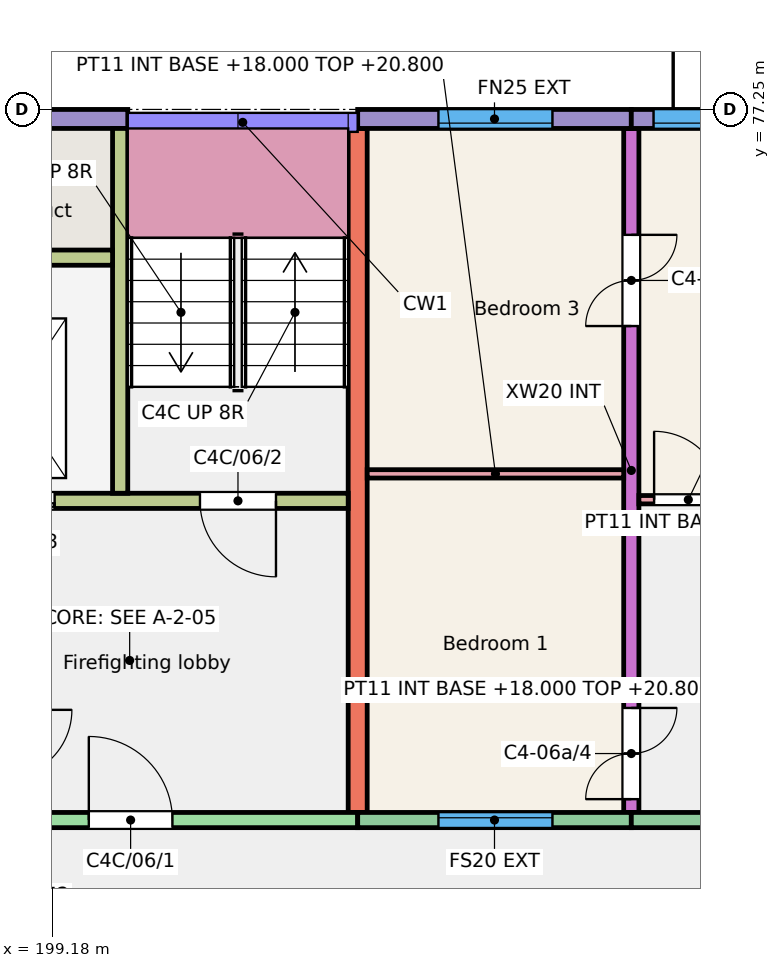
"""IFC4 building model, lengths in metres.
Left out: names, types, materials, properties, quantities, classifications, styles, units other than length and angle.
Written with IfcOpenShell. Run it as: python <this file> out.ifc"""

import sys

from ifc_helpers import new_model, si_unit, direction, frame, frame_2d, origin, place, context, subcontext, project, spatial, rectangle, extrude, element, fill, save


model = new_model("IFC4")
c1 = context("Model", 3, precision=1e-05, world=origin(), true_north=direction((0.0, 1.0)))
c2 = subcontext(c1, "Body", "Model", "MODEL_VIEW")
j1 = project(units=[si_unit("LENGTHUNIT", "METRE"), si_unit("PLANEANGLEUNIT", "RADIAN")], contexts=[c1])
p1 = place(None, origin())
s1 = spatial("IfcSite", under=j1, at=p1, CompositionType="ELEMENT")
p2 = place(p1, origin())
s2 = spatial("IfcBuilding", under=s1, at=p2, CompositionType="ELEMENT")
p3 = place(p2, frame((0.0, 0.0, 18.0)))
s3 = spatial("IfcBuildingStorey", under=s2, at=p3, CompositionType="ELEMENT", Elevation=18.0)
p4 = place(p3, frame((203.2, 68.0, 0.0), z_axis=(0.0, 0.0, 1.0), x_axis=(0.0, 1.0, 0.0)))
e1 = element("IfcWall", 1, at=p4, inside=s3, PredefinedType="SHEAR", context=c2, shape_type="SweptSolid", body=[
    extrude(rectangle(XDim=9.0, YDim=0.25, at=frame_2d((4.5, 0.0))), origin(), (0.0, 0.0, 1.0), 3.0),
])
p5 = place(p3, frame((206.8, 68.0, 0.0), z_axis=(0.0, 0.0, 1.0), x_axis=(0.0, 1.0, 0.0)))
e2 = element("IfcWall", 2, at=p5, inside=s3, PredefinedType="SHEAR", context=c2, shape_type="SweptSolid", body=[
    extrude(rectangle(XDim=9.0, YDim=0.2, at=frame_2d((4.5, 0.0))), origin(), (0.0, 0.0, 1.0), 3.0),
])
p6 = place(p5, frame((0.175, 0.0, 0.0)))
e3 = element("IfcOpeningElement", 3, at=p6, cuts=e2, PredefinedType="OPENING", context=c2, shape_type="SweptSolid", body=[
    extrude(rectangle(XDim=1.2, YDim=2.1, at=frame_2d((0.6, 1.05))), frame((0.0, 0.11, 0.0), z_axis=(0.0, -1.0, 0.0), x_axis=(1.0, 0.0, 0.0)), (0.0, 0.0, 1.0), 0.22),
])
p7 = place(p5, frame((6.4, 0.0, 0.0)))
e4 = element("IfcOpeningElement", 4, at=p7, cuts=e2, PredefinedType="OPENING", context=c2, shape_type="SweptSolid", body=[
    extrude(rectangle(XDim=1.2, YDim=2.1, at=frame_2d((0.6, 1.05))), frame((0.0, 0.11, 0.0), z_axis=(0.0, -1.0, 0.0), x_axis=(1.0, 0.0, 0.0)), (0.0, 0.0, 1.0), 0.22),
])
p8 = place(p3, frame((197.2, 77.125, 0.0), z_axis=(0.0, 0.0, 1.0), x_axis=(1.0, 0.0, 0.0)))
e5 = element("IfcWall", 5, at=p8, inside=s3, PredefinedType="SOLIDWALL", context=c2, shape_type="SweptSolid", body=[
    extrude(rectangle(XDim=2.975, YDim=0.25, at=frame_2d((1.488, 0.0))), origin(), (0.0, 0.0, 1.0), 3.0),
])
p9 = place(p3, frame((197.35, 67.9, 0.0), z_axis=(0.0, 0.0, 1.0), x_axis=(1.0, 0.0, 0.0)))
e6 = element("IfcWall", 6, at=p9, inside=s3, PredefinedType="SHEAR", context=c2, shape_type="SweptSolid", body=[
    extrude(rectangle(XDim=5.85, YDim=0.2, at=frame_2d((2.925, 0.0))), origin(), (0.0, 0.0, 1.0), 3.0),
])
p10 = place(p9, frame((2.312, 0.0, 0.0)))
e7 = element("IfcOpeningElement", 7, at=p10, cuts=e6, PredefinedType="OPENING", context=c2, shape_type="SweptSolid", body=[
    extrude(rectangle(XDim=1.1, YDim=2.1, at=frame_2d((0.55, 1.05))), frame((0.0, 0.11, 0.0), z_axis=(0.0, -1.0, 0.0), x_axis=(1.0, 0.0, 0.0)), (0.0, 0.0, 1.0), 0.22),
])
p11 = place(p3, frame((197.35, 72.1, 0.0), z_axis=(0.0, 0.0, 1.0), x_axis=(1.0, 0.0, 0.0)))
e8 = element("IfcWall", 8, at=p11, inside=s3, PredefinedType="SHEAR", context=c2, shape_type="SweptSolid", body=[
    extrude(rectangle(XDim=5.725, YDim=0.2, at=frame_2d((2.862, 0.0))), origin(), (0.0, 0.0, 1.0), 3.0),
])
p12 = place(p11, frame((3.775, 0.0, 0.0)))
e9 = element("IfcOpeningElement", 9, at=p12, cuts=e8, PredefinedType="OPENING", context=c2, shape_type="SweptSolid", body=[
    extrude(rectangle(XDim=1.0, YDim=2.1, at=frame_2d((0.5, 1.05))), frame((0.0, 0.11, 0.0), z_axis=(0.0, -1.0, 0.0), x_axis=(1.0, 0.0, 0.0)), (0.0, 0.0, 1.0), 0.22),
])
p13 = place(p11, frame((0.762, 0.0, 0.0)))
e10 = element("IfcOpeningElement", 10, at=p13, cuts=e8, PredefinedType="OPENING", context=c2, shape_type="SweptSolid", body=[
    extrude(rectangle(XDim=1.1, YDim=2.1, at=frame_2d((0.55, 1.05))), frame((0.0, 0.11, 0.0), z_axis=(0.0, -1.0, 0.0), x_axis=(1.0, 0.0, 0.0)), (0.0, 0.0, 1.0), 0.22),
])
p14 = place(p3, frame((200.075, 72.2, 0.0), z_axis=(0.0, 0.0, 1.0), x_axis=(0.0, 1.0, 0.0)))
e11 = element("IfcWall", 11, at=p14, inside=s3, PredefinedType="SHEAR", context=c2, shape_type="SweptSolid", body=[
    extrude(rectangle(XDim=4.8, YDim=0.2, at=frame_2d((2.4, 0.0))), origin(), (0.0, 0.0, 1.0), 3.0),
])
p15 = place(p3, frame((197.35, 75.3, 0.0), z_axis=(0.0, 0.0, 1.0), x_axis=(1.0, 0.0, 0.0)))
e12 = element("IfcWall", 12, at=p15, inside=s3, PredefinedType="SHEAR", context=c2, shape_type="SweptSolid", body=[
    extrude(rectangle(XDim=2.625, YDim=0.2, at=frame_2d((1.312, 0.0))), origin(), (0.0, 0.0, 1.0), 3.0),
])
p16 = place(p3, frame((203.2, 77.125, 0.0), z_axis=(0.0, 0.0, 1.0), x_axis=(1.0, 0.0, 0.0)))
e13 = element("IfcWall", 13, at=p16, inside=s3, PredefinedType="SOLIDWALL", context=c2, shape_type="SweptSolid", body=[
    extrude(rectangle(XDim=3.6, YDim=0.25, at=frame_2d((1.8, 0.0))), origin(), (0.0, 0.0, 1.0), 3.0),
])
p17 = place(p16, frame((1.062, 0.0, 0.9)))
e14 = element("IfcOpeningElement", 14, at=p17, cuts=e13, PredefinedType="OPENING", context=c2, shape_type="SweptSolid", body=[
    extrude(rectangle(XDim=1.5, YDim=1.5, at=frame_2d((0.75, 0.75))), frame((0.0, 0.135, 0.0), z_axis=(0.0, -1.0, 0.0), x_axis=(1.0, 0.0, 0.0)), (0.0, 0.0, 1.0), 0.27),
])
p18 = place(p3, frame((203.2, 67.9, 0.0), z_axis=(0.0, 0.0, 1.0), x_axis=(1.0, 0.0, 0.0)))
e15 = element("IfcWall", 15, at=p18, inside=s3, PredefinedType="SOLIDWALL", context=c2, shape_type="SweptSolid", body=[
    extrude(rectangle(XDim=3.6, YDim=0.2, at=frame_2d((1.8, 0.0))), origin(), (0.0, 0.0, 1.0), 3.0),
])
p19 = place(p18, frame((1.062, 0.0, 0.9)))
e16 = element("IfcOpeningElement", 16, at=p19, cuts=e15, PredefinedType="OPENING", context=c2, shape_type="SweptSolid", body=[
    extrude(rectangle(XDim=1.5, YDim=1.5, at=frame_2d((0.75, 0.75))), frame((0.0, 0.11, 0.0), z_axis=(0.0, -1.0, 0.0), x_axis=(1.0, 0.0, 0.0)), (0.0, 0.0, 1.0), 0.22),
])
p20 = place(p3, frame((206.8, 77.125, 0.0), z_axis=(0.0, 0.0, 1.0), x_axis=(1.0, 0.0, 0.0)))
e17 = element("IfcWall", 17, at=p20, inside=s3, PredefinedType="SOLIDWALL", context=c2, shape_type="SweptSolid", body=[
    extrude(rectangle(XDim=3.6, YDim=0.25, at=frame_2d((1.8, 0.0))), origin(), (0.0, 0.0, 1.0), 3.0),
])
p21 = place(p20, frame((0.292, 0.0, 0.9)))
e18 = element("IfcOpeningElement", 18, at=p21, cuts=e17, PredefinedType="OPENING", context=c2, shape_type="SweptSolid", body=[
    extrude(rectangle(XDim=1.5, YDim=1.5, at=frame_2d((0.75, 0.75))), frame((0.0, 0.135, 0.0), z_axis=(0.0, -1.0, 0.0), x_axis=(1.0, 0.0, 0.0)), (0.0, 0.0, 1.0), 0.27),
])
p22 = place(p20, frame((2.085, 0.0, 0.0)))
e19 = element("IfcOpeningElement", 19, at=p22, cuts=e17, PredefinedType="OPENING", context=c2, shape_type="SweptSolid", body=[
    extrude(rectangle(XDim=1.0, YDim=2.1, at=frame_2d((0.5, 1.05))), frame((0.0, 0.135, 0.0), z_axis=(0.0, -1.0, 0.0), x_axis=(1.0, 0.0, 0.0)), (0.0, 0.0, 1.0), 0.27),
])
p23 = place(p3, frame((206.8, 67.9, 0.0), z_axis=(0.0, 0.0, 1.0), x_axis=(1.0, 0.0, 0.0)))
e20 = element("IfcWall", 20, at=p23, inside=s3, PredefinedType="SOLIDWALL", context=c2, shape_type="SweptSolid", body=[
    extrude(rectangle(XDim=3.6, YDim=0.2, at=frame_2d((1.8, 0.0))), origin(), (0.0, 0.0, 1.0), 3.0),
])
p24 = place(p23, frame((1.3, 0.0, 0.0)))
e21 = element("IfcOpeningElement", 21, at=p24, cuts=e20, PredefinedType="OPENING", context=c2, shape_type="SweptSolid", body=[
    extrude(rectangle(XDim=1.0, YDim=2.1, at=frame_2d((0.5, 1.05))), frame((0.0, 0.11, 0.0), z_axis=(0.0, -1.0, 0.0), x_axis=(1.0, 0.0, 0.0)), (0.0, 0.0, 1.0), 0.22),
])
p25 = place(p3, frame((206.9, 72.115, 0.0), z_axis=(0.0, 0.0, 1.0), x_axis=(1.0, 0.0, 0.0)))
e22 = element("IfcWall", 22, at=p25, inside=s3, PredefinedType="PARTITIONING", context=c2, shape_type="SweptSolid", body=[
    extrude(rectangle(XDim=3.4, YDim=0.11, at=frame_2d((1.7, 0.0))), origin(), (0.0, 0.0, 1.0), 2.8),
])
p26 = place(p25, frame((0.2, 0.0, 0.0)))
e23 = element("IfcOpeningElement", 23, at=p26, cuts=e22, PredefinedType="OPENING", context=c2, shape_type="SweptSolid", body=[
    extrude(rectangle(XDim=0.9, YDim=2.1, at=frame_2d((0.45, 1.05))), frame((0.0, 0.065, 0.0), z_axis=(0.0, -1.0, 0.0), x_axis=(1.0, 0.0, 0.0)), (0.0, 0.0, 1.0), 0.13),
])
p27 = place(p3, frame((203.325, 72.455, 0.0), z_axis=(0.0, 0.0, 1.0), x_axis=(1.0, 0.0, 0.0)))
e24 = element("IfcWall", 24, at=p27, inside=s3, PredefinedType="PARTITIONING", context=c2, shape_type="SweptSolid", body=[
    extrude(rectangle(XDim=3.375, YDim=0.11, at=frame_2d((1.688, 0.0))), origin(), (0.0, 0.0, 1.0), 2.8),
])
p28 = place(p19, origin())
e25 = element("IfcWindow", 25, at=p28, inside=s3, PartitioningType="SINGLE_PANEL", PredefinedType="WINDOW", context=c2, shape_type="SweptSolid", body=[
    extrude(rectangle(XDim=1.5, YDim=1.5, at=frame_2d((0.75, 0.75))), frame((0.0, 0.06, 0.0), z_axis=(0.0, -1.0, 0.0), x_axis=(1.0, 0.0, 0.0)), (0.0, 0.0, 1.0), 0.06),
])
fill(e16, e25)
p29 = place(p17, origin())
e26 = element("IfcWindow", 26, at=p29, inside=s3, PartitioningType="SINGLE_PANEL", PredefinedType="WINDOW", context=c2, shape_type="SweptSolid", body=[
    extrude(rectangle(XDim=1.5, YDim=1.5, at=frame_2d((0.75, 0.75))), frame((0.0, -0.025, 0.0), z_axis=(0.0, -1.0, 0.0), x_axis=(1.0, 0.0, 0.0)), (0.0, 0.0, 1.0), 0.06),
])
fill(e14, e26)
p30 = place(p21, origin())
e27 = element("IfcWindow", 27, at=p30, inside=s3, PartitioningType="SINGLE_PANEL", PredefinedType="WINDOW", context=c2, shape_type="SweptSolid", body=[
    extrude(rectangle(XDim=1.5, YDim=1.5, at=frame_2d((0.75, 0.75))), frame((0.0, -0.025, 0.0), z_axis=(0.0, -1.0, 0.0), x_axis=(1.0, 0.0, 0.0)), (0.0, 0.0, 1.0), 0.06),
])
fill(e18, e27)
p31 = place(p26, origin())
e28 = element("IfcDoor", 28, at=p31, inside=s3, OperationType="SINGLE_SWING_LEFT", PredefinedType="DOOR", context=c2, shape_type="SweptSolid", body=[
    extrude(rectangle(XDim=0.9, YDim=2.1, at=frame_2d((0.45, 1.05))), frame((0.0, 0.025, 0.0), z_axis=(0.0, -1.0, 0.0), x_axis=(1.0, 0.0, 0.0)), (0.0, 0.0, 1.0), 0.05),
])
fill(e23, e28)
p32 = place(p6, origin())
e29 = element("IfcDoor", 29, at=p32, inside=s3, OperationType="DOUBLE_DOOR_SINGLE_SWING", PredefinedType="DOOR", context=c2, shape_type="SweptSolid", body=[
    extrude(rectangle(XDim=1.2, YDim=2.1, at=frame_2d((0.6, 1.05))), frame((0.0, 0.025, 0.0), z_axis=(0.0, -1.0, 0.0), x_axis=(1.0, 0.0, 0.0)), (0.0, 0.0, 1.0), 0.05),
])
fill(e3, e29)
p33 = place(p7, origin())
e30 = element("IfcDoor", 30, at=p33, inside=s3, OperationType="DOUBLE_DOOR_SINGLE_SWING", PredefinedType="DOOR", context=c2, shape_type="SweptSolid", body=[
    extrude(rectangle(XDim=1.2, YDim=2.1, at=frame_2d((0.6, 1.05))), frame((0.0, 0.025, 0.0), z_axis=(0.0, -1.0, 0.0), x_axis=(1.0, 0.0, 0.0)), (0.0, 0.0, 1.0), 0.05),
])
fill(e4, e30)
p34 = place(p10, origin())
e31 = element("IfcDoor", 31, at=p34, inside=s3, OperationType="SINGLE_SWING_LEFT", PredefinedType="DOOR", context=c2, shape_type="SweptSolid", body=[
    extrude(rectangle(XDim=1.1, YDim=2.1, at=frame_2d((0.55, 1.05))), frame((0.0, 0.025, 0.0), z_axis=(0.0, -1.0, 0.0), x_axis=(1.0, 0.0, 0.0)), (0.0, 0.0, 1.0), 0.05),
])
fill(e7, e31)
p35 = place(p12, origin())
e32 = element("IfcDoor", 32, at=p35, inside=s3, OperationType="SINGLE_SWING_RIGHT", PredefinedType="DOOR", context=c2, shape_type="SweptSolid", body=[
    extrude(rectangle(XDim=1.0, YDim=2.1, at=frame_2d((0.5, 1.05))), frame((0.0, 0.025, 0.0), z_axis=(0.0, -1.0, 0.0), x_axis=(1.0, 0.0, 0.0)), (0.0, 0.0, 1.0), 0.05),
])
fill(e9, e32)
p36 = place(p13, origin())
e33 = element("IfcDoor", 33, at=p36, inside=s3, OperationType="DOUBLE_DOOR_SLIDING", PredefinedType="DOOR", context=c2, shape_type="SweptSolid", body=[
    extrude(rectangle(XDim=1.1, YDim=2.1, at=frame_2d((0.55, 1.05))), frame((0.0, 0.025, 0.0), z_axis=(0.0, -1.0, 0.0), x_axis=(1.0, 0.0, 0.0)), (0.0, 0.0, 1.0), 0.05),
])
fill(e10, e33)
save(model, sys.argv[1])
